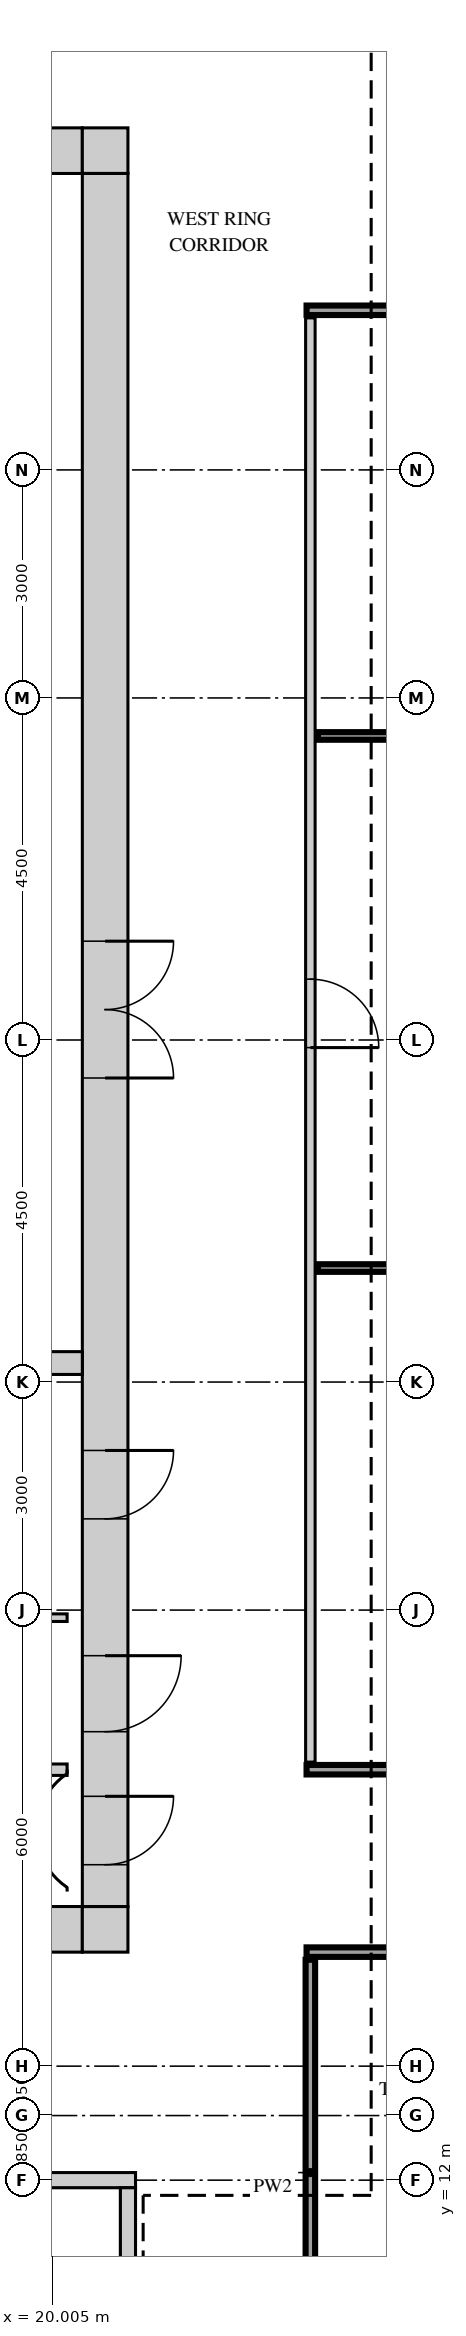
"""IFC4 building model, lengths in metres.
Left out: names, types, materials, properties, quantities, classifications, styles, units other than length and angle.
Written with IfcOpenShell. Run it as: python <this file> out.ifc"""

import sys

from ifc_helpers import new_model, si_unit, direction, frame, frame_2d, origin, place, context, subcontext, project, spatial, rectangle, extrude, source, transform, mapped, element, fill, save


model = new_model("IFC4")
c1 = context("Model", 3, precision=1e-05, world=origin(), true_north=direction((0.0, 1.0)))
c2 = subcontext(c1, "Body", "Model", "MODEL_VIEW")
j1 = project(units=[si_unit("LENGTHUNIT", "METRE"), si_unit("PLANEANGLEUNIT", "RADIAN")], contexts=[c1])
p1 = place(None, origin())
s1 = spatial("IfcSite", under=j1, at=p1, CompositionType="ELEMENT")
p2 = place(p1, origin())
s2 = spatial("IfcBuilding", under=s1, at=p2, CompositionType="ELEMENT")
p3 = place(p2, frame((0.0, 0.0, 290.2)))
s3 = spatial("IfcBuildingStorey", under=s2, at=p3, CompositionType="ELEMENT", Elevation=290.2)
m1 = source(origin(), c2, "Body", "SweptSolid", [
    extrude(rectangle(XDim=14.4, YDim=0.6, at=frame_2d((7.2, 0.0))), origin(), (0.0, 0.0, 1.0), 3.75),
])
p4 = place(p3, frame((6.0, 38.7, 0.0), z_axis=(0.0, 0.0, 1.0), x_axis=(1.0, 0.0, 0.0)))
e1 = element("IfcWall", 1, at=p4, inside=s3, PredefinedType="SHEAR", context=c2, shape_type="MappedRepresentation", body=[
    mapped(m1, transform((0.0, 0.0, 0.0))),
])
m2 = source(origin(), c2, "Body", "SweptSolid", [
    extrude(rectangle(XDim=0.9, YDim=2.1, at=frame_2d((0.45, 1.05))), frame((0.0, 0.31, 0.0), z_axis=(0.0, -1.0, 0.0), x_axis=(1.0, 0.0, 0.0)), (0.0, 0.0, 1.0), 0.62),
])
p5 = place(p4, frame((2.55, 0.0, 0.0)))
e2 = element("IfcOpeningElement", 2, at=p5, cuts=e1, PredefinedType="OPENING", context=c2, shape_type="MappedRepresentation", body=[
    mapped(m2, transform((0.0, 0.0, 0.0))),
])
p6 = place(p4, frame((7.0, 0.0, 0.0)))
e3 = element("IfcOpeningElement", 3, at=p6, cuts=e1, PredefinedType="OPENING", context=c2, shape_type="MappedRepresentation", body=[
    mapped(m2, transform((0.0, 0.0, 0.0))),
])
p7 = place(p4, frame((11.5, 0.0, 0.0)))
e4 = element("IfcOpeningElement", 4, at=p7, cuts=e1, PredefinedType="OPENING", context=c2, shape_type="MappedRepresentation", body=[
    mapped(m2, transform((0.0, 0.0, 0.0))),
])
m3 = source(origin(), c2, "Body", "SweptSolid", [
    extrude(rectangle(XDim=0.6, YDim=0.6, at=frame_2d((0.3, 0.0))), origin(), (0.0, 0.0, 1.0), 3.75),
])
p8 = place(p3, frame((20.4, 38.7, 0.0), z_axis=(0.0, 0.0, 1.0), x_axis=(1.0, 0.0, 0.0)))
e5 = element("IfcWall", 5, at=p8, inside=s3, PredefinedType="SHEAR", context=c2, shape_type="MappedRepresentation", body=[
    mapped(m3, transform((0.0, 0.0, 0.0))),
])
p9 = place(p3, frame((6.0, 15.3, 0.0), z_axis=(0.0, 0.0, 1.0), x_axis=(1.0, 0.0, 0.0)))
e6 = element("IfcWall", 6, at=p9, inside=s3, PredefinedType="SHEAR", context=c2, shape_type="MappedRepresentation", body=[
    mapped(m1, transform((0.0, 0.0, 0.0))),
])
m4 = source(origin(), c2, "Body", "SweptSolid", [
    extrude(rectangle(XDim=1.2, YDim=2.1, at=frame_2d((0.6, 1.05))), frame((0.0, 0.31, 0.0), z_axis=(0.0, -1.0, 0.0), x_axis=(1.0, 0.0, 0.0)), (0.0, 0.0, 1.0), 0.62),
])
p10 = place(p9, frame((6.2, 0.0, 0.0)))
e7 = element("IfcOpeningElement", 7, at=p10, cuts=e6, PredefinedType="OPENING", context=c2, shape_type="MappedRepresentation", body=[
    mapped(m4, transform((0.0, 0.0, 0.0))),
])
p11 = place(p9, frame((2.85, 0.0, 0.0)))
e8 = element("IfcOpeningElement", 8, at=p11, cuts=e6, PredefinedType="OPENING", context=c2, shape_type="MappedRepresentation", body=[
    mapped(m4, transform((0.0, 0.0, 0.0))),
])
m5 = source(origin(), c2, "Body", "SweptSolid", [
    extrude(rectangle(XDim=1.0, YDim=2.1, at=frame_2d((0.5, 1.05))), frame((0.0, 0.31, 0.0), z_axis=(0.0, -1.0, 0.0), x_axis=(1.0, 0.0, 0.0)), (0.0, 0.0, 1.0), 0.62),
])
p12 = place(p9, frame((8.7, 0.0, 0.0)))
e9 = element("IfcOpeningElement", 9, at=p12, cuts=e6, PredefinedType="OPENING", context=c2, shape_type="MappedRepresentation", body=[
    mapped(m5, transform((0.0, 0.0, 0.0))),
])
p13 = place(p3, frame((20.4, 15.3, 0.0), z_axis=(0.0, 0.0, 1.0), x_axis=(1.0, 0.0, 0.0)))
e10 = element("IfcWall", 10, at=p13, inside=s3, PredefinedType="SHEAR", context=c2, shape_type="MappedRepresentation", body=[
    mapped(m3, transform((0.0, 0.0, 0.0))),
])
m6 = source(origin(), c2, "Body", "SweptSolid", [
    extrude(rectangle(XDim=22.8, YDim=0.6, at=frame_2d((11.4, 0.0))), origin(), (0.0, 0.0, 1.0), 3.75),
])
p14 = place(p3, frame((20.7, 15.6, 0.0), z_axis=(0.0, 0.0, 1.0), x_axis=(0.0, 1.0, 0.0)))
e11 = element("IfcWall", 11, at=p14, inside=s3, PredefinedType="SHEAR", context=c2, shape_type="MappedRepresentation", body=[
    mapped(m6, transform((0.0, 0.0, 0.0))),
])
m7 = source(origin(), c2, "Body", "SweptSolid", [
    extrude(rectangle(XDim=1.8, YDim=2.1, at=frame_2d((0.9, 1.05))), frame((0.0, 0.31, 0.0), z_axis=(0.0, -1.0, 0.0), x_axis=(1.0, 0.0, 0.0)), (0.0, 0.0, 1.0), 0.62),
])
p15 = place(p14, frame((10.9, 0.0, 0.0)))
e12 = element("IfcOpeningElement", 12, at=p15, cuts=e11, PredefinedType="OPENING", context=c2, shape_type="MappedRepresentation", body=[
    mapped(m7, transform((0.0, 0.0, 0.0))),
])
p16 = place(p14, frame((0.55, 0.0, 0.0)))
e13 = element("IfcOpeningElement", 13, at=p16, cuts=e11, PredefinedType="OPENING", context=c2, shape_type="MappedRepresentation", body=[
    mapped(m2, transform((0.0, 0.0, 0.0))),
])
p17 = place(p14, frame((2.3, 0.0, 0.0)))
e14 = element("IfcOpeningElement", 14, at=p17, cuts=e11, PredefinedType="OPENING", context=c2, shape_type="MappedRepresentation", body=[
    mapped(m5, transform((0.0, 0.0, 0.0))),
])
p18 = place(p14, frame((5.1, 0.0, 0.0)))
e15 = element("IfcOpeningElement", 15, at=p18, cuts=e11, PredefinedType="OPENING", context=c2, shape_type="MappedRepresentation", body=[
    mapped(m2, transform((0.0, 0.0, 0.0))),
])
m8 = source(origin(), c2, "Body", "SweptSolid", [
    extrude(rectangle(XDim=7.2, YDim=0.2, at=frame_2d((3.6, 0.0))), origin(), (0.0, 0.0, 1.0), 3.75),
])
p19 = place(p3, frame((13.9, 12.0, 0.0), z_axis=(0.0, 0.0, 1.0), x_axis=(1.0, 0.0, 0.0)))
e16 = element("IfcWall", 16, at=p19, inside=s3, PredefinedType="SHEAR", context=c2, shape_type="MappedRepresentation", body=[
    mapped(m8, transform((0.0, 0.0, 0.0))),
])
m9 = source(origin(), c2, "Body", "SweptSolid", [
    extrude(rectangle(XDim=3.35, YDim=0.2, at=frame_2d((1.675, 0.0))), origin(), (0.0, 0.0, 1.0), 3.75),
])
p20 = place(p3, frame((21.0, 8.55, 0.0), z_axis=(0.0, 0.0, 1.0), x_axis=(0.0, 1.0, 0.0)))
e17 = element("IfcWall", 17, at=p20, inside=s3, PredefinedType="SHEAR", context=c2, shape_type="MappedRepresentation", body=[
    mapped(m9, transform((0.0, 0.0, 0.0))),
])
m10 = source(origin(), c2, "Body", "SweptSolid", [
    extrude(rectangle(XDim=13.2, YDim=0.3, at=frame_2d((6.6, 0.0))), origin(), (0.0, 0.0, 1.0), 3.75),
])
p21 = place(p3, frame((7.2, 22.75, 0.0), z_axis=(0.0, 0.0, 1.0), x_axis=(1.0, 0.0, 0.0)))
e18 = element("IfcWall", 18, at=p21, inside=s3, PredefinedType="STANDARD", context=c2, shape_type="MappedRepresentation", body=[
    mapped(m10, transform((0.0, 0.0, 0.0))),
])
m11 = source(origin(), c2, "Body", "SweptSolid", [
    extrude(rectangle(XDim=8.75, YDim=0.125, at=frame_2d((4.375, 0.0))), origin(), (0.0, 0.0, 1.0), 3.8),
])
p22 = place(p3, frame((23.4, 6.15, 0.0), z_axis=(0.0, 0.0, 1.0), x_axis=(0.0, 1.0, 0.0)))
e19 = element("IfcWall", 19, at=p22, inside=s3, PredefinedType="PARTITIONING", context=c2, shape_type="MappedRepresentation", body=[
    mapped(m11, transform((0.0, 0.0, 0.0))),
])
m12 = source(origin(), c2, "Body", "SweptSolid", [
    extrude(rectangle(XDim=0.9, YDim=2.1, at=frame_2d((0.45, 1.05))), frame((0.0, 0.073, 0.0), z_axis=(0.0, -1.0, 0.0), x_axis=(1.0, 0.0, 0.0)), (0.0, 0.0, 1.0), 0.145),
])
p23 = place(p22, frame((2.25, 0.0, 0.0)))
e20 = element("IfcOpeningElement", 20, at=p23, cuts=e19, PredefinedType="OPENING", context=c2, shape_type="MappedRepresentation", body=[
    mapped(m12, transform((0.0, 0.0, 0.0))),
])
m13 = source(origin(), c2, "Body", "SweptSolid", [
    extrude(rectangle(XDim=19.1, YDim=0.125, at=frame_2d((9.55, 0.0))), origin(), (0.0, 0.0, 1.0), 3.8),
])
p24 = place(p3, frame((23.35, 15.0, 0.0), z_axis=(0.0, 0.0, 1.0), x_axis=(1.0, 0.0, 0.0)))
e21 = element("IfcWall", 21, at=p24, inside=s3, PredefinedType="PARTITIONING", context=c2, shape_type="MappedRepresentation", body=[
    mapped(m13, transform((0.0, 0.0, 0.0))),
])
p25 = place(p24, frame((7.1, 0.0, 0.0)))
e22 = element("IfcOpeningElement", 22, at=p25, cuts=e21, PredefinedType="OPENING", context=c2, shape_type="MappedRepresentation", body=[
    mapped(m12, transform((0.0, 0.0, 0.0))),
])
p26 = place(p24, frame((13.3, 0.0, 0.0)))
e23 = element("IfcOpeningElement", 23, at=p26, cuts=e21, PredefinedType="OPENING", context=c2, shape_type="MappedRepresentation", body=[
    mapped(m12, transform((0.0, 0.0, 0.0))),
])
m14 = source(origin(), c2, "Body", "SweptSolid", [
    extrude(rectangle(XDim=4.0, YDim=0.15, at=frame_2d((2.0, 0.0))), origin(), (0.0, 0.0, 1.0), 3.8),
])
p27 = place(p3, frame((16.2, 17.4, 0.0), z_axis=(0.0, 0.0, 1.0), x_axis=(1.0, 0.0, 0.0)))
e24 = element("IfcWall", 24, at=p27, inside=s3, PredefinedType="PARTITIONING", context=c2, shape_type="MappedRepresentation", body=[
    mapped(m14, transform((0.0, 0.0, 0.0))),
])
m15 = source(origin(), c2, "Body", "SweptSolid", [
    extrude(rectangle(XDim=16.7, YDim=0.125, at=frame_2d((8.35, 0.0))), origin(), (0.0, 0.0, 1.0), 3.8),
])
p28 = place(p3, frame((23.35, 17.4, 0.0), z_axis=(0.0, 0.0, 1.0), x_axis=(1.0, 0.0, 0.0)))
e25 = element("IfcWall", 25, at=p28, inside=s3, PredefinedType="PARTITIONING", context=c2, shape_type="MappedRepresentation", body=[
    mapped(m15, transform((0.0, 0.0, 0.0))),
])
p29 = place(p28, frame((8.05, 0.0, 0.0)))
e26 = element("IfcOpeningElement", 26, at=p29, cuts=e25, PredefinedType="OPENING", context=c2, shape_type="MappedRepresentation", body=[
    mapped(m12, transform((0.0, 0.0, 0.0))),
])
m16 = source(origin(), c2, "Body", "SweptSolid", [
    extrude(rectangle(XDim=19.0, YDim=0.125, at=frame_2d((9.5, 0.0))), origin(), (0.0, 0.0, 1.0), 3.8),
])
p30 = place(p3, frame((23.4, 17.5, 0.0), z_axis=(0.0, 0.0, 1.0), x_axis=(0.0, 1.0, 0.0)))
e27 = element("IfcWall", 27, at=p30, inside=s3, PredefinedType="PARTITIONING", context=c2, shape_type="MappedRepresentation", body=[
    mapped(m16, transform((0.0, 0.0, 0.0))),
])
p31 = place(p30, frame((9.4, 0.0, 0.0)))
e28 = element("IfcOpeningElement", 28, at=p31, cuts=e27, PredefinedType="OPENING", context=c2, shape_type="MappedRepresentation", body=[
    mapped(m12, transform((0.0, 0.0, 0.0))),
])
m17 = source(origin(), c2, "Body", "SweptSolid", [
    extrude(rectangle(XDim=4.1, YDim=0.1, at=frame_2d((2.05, 0.0))), origin(), (0.0, 0.0, 1.0), 3.8),
])
p32 = place(p3, frame((16.1, 19.4, 0.0), z_axis=(0.0, 0.0, 1.0), x_axis=(1.0, 0.0, 0.0)))
e29 = element("IfcWall", 29, at=p32, inside=s3, PredefinedType="PARTITIONING", context=c2, shape_type="MappedRepresentation", body=[
    mapped(m17, transform((0.0, 0.0, 0.0))),
])
m18 = source(origin(), c2, "Body", "SweptSolid", [
    extrude(rectangle(XDim=16.4, YDim=0.1, at=frame_2d((8.2, 0.0))), origin(), (0.0, 0.0, 1.0), 3.8),
])
for number, where, z_axis, x_axis in (
    (30, (23.5, 24.0, 0.0), (0.0, 0.0, 1.0), (1.0, 0.0, 0.0)),
    (31, (23.5, 31.0, 0.0), (0.0, 0.0, 1.0), (1.0, 0.0, 0.0)),
):
    element("IfcWall", number, at=place(p3, frame(where, z_axis=z_axis, x_axis=x_axis)), inside=s3, PredefinedType="PARTITIONING", context=c2, shape_type="MappedRepresentation", body=[
        mapped(m18, transform((0.0, 0.0, 0.0))),
    ])
p33 = place(p3, frame((23.35, 36.6, 0.0), z_axis=(0.0, 0.0, 1.0), x_axis=(1.0, 0.0, 0.0)))
e32 = element("IfcWall", 32, at=p33, inside=s3, PredefinedType="PARTITIONING", context=c2, shape_type="MappedRepresentation", body=[
    mapped(m15, transform((0.0, 0.0, 0.0))),
])
p34 = place(p33, frame((8.05, 0.0, 0.0)))
e33 = element("IfcOpeningElement", 33, at=p34, cuts=e32, PredefinedType="OPENING", context=c2, shape_type="MappedRepresentation", body=[
    mapped(m12, transform((0.0, 0.0, 0.0))),
])
m19 = source(origin(), c2, "Body", "SweptSolid", [
    extrude(rectangle(XDim=1.8, YDim=2.1, at=frame_2d((0.9, 1.05))), frame((0.0, 0.25, 0.0), z_axis=(0.0, -1.0, 0.0), x_axis=(1.0, 0.0, 0.0)), (0.0, 0.0, 1.0), 0.5),
])
p35 = place(p15, origin())
e34 = element("IfcDoor", 34, at=p35, inside=s3, OperationType="DOUBLE_DOOR_SINGLE_SWING", PredefinedType="DOOR", context=c2, shape_type="MappedRepresentation", body=[
    mapped(m19, transform((0.0, 0.0, 0.0))),
])
fill(e12, e34)
m20 = source(origin(), c2, "Body", "SweptSolid", [
    extrude(rectangle(XDim=0.9, YDim=2.1, at=frame_2d((0.45, 1.05))), frame((0.0, 0.25, 0.0), z_axis=(0.0, -1.0, 0.0), x_axis=(1.0, 0.0, 0.0)), (0.0, 0.0, 1.0), 0.5),
])
p36 = place(p16, origin())
e35 = element("IfcDoor", 35, at=p36, inside=s3, OperationType="SINGLE_SWING_RIGHT", PredefinedType="DOOR", context=c2, shape_type="MappedRepresentation", body=[
    mapped(m20, transform((0.0, 0.0, 0.0))),
])
fill(e13, e35)
m21 = source(origin(), c2, "Body", "SweptSolid", [
    extrude(rectangle(XDim=1.0, YDim=2.1, at=frame_2d((0.5, 1.05))), frame((0.0, 0.25, 0.0), z_axis=(0.0, -1.0, 0.0), x_axis=(1.0, 0.0, 0.0)), (0.0, 0.0, 1.0), 0.5),
])
p37 = place(p17, origin())
e36 = element("IfcDoor", 36, at=p37, inside=s3, OperationType="SINGLE_SWING_RIGHT", PredefinedType="DOOR", context=c2, shape_type="MappedRepresentation", body=[
    mapped(m21, transform((0.0, 0.0, 0.0))),
])
fill(e14, e36)
p38 = place(p18, origin())
e37 = element("IfcDoor", 37, at=p38, inside=s3, OperationType="SINGLE_SWING_RIGHT", PredefinedType="DOOR", context=c2, shape_type="MappedRepresentation", body=[
    mapped(m20, transform((0.0, 0.0, 0.0))),
])
fill(e15, e37)
m22 = source(origin(), c2, "Body", "SweptSolid", [
    extrude(rectangle(XDim=0.9, YDim=2.1, at=frame_2d((0.45, 1.05))), frame((0.0, 0.025, 0.0), z_axis=(0.0, -1.0, 0.0), x_axis=(1.0, 0.0, 0.0)), (0.0, 0.0, 1.0), 0.05),
])
p39 = place(p31, origin())
e38 = element("IfcDoor", 38, at=p39, inside=s3, OperationType="SINGLE_SWING_LEFT", PredefinedType="DOOR", context=c2, shape_type="MappedRepresentation", body=[
    mapped(m22, transform((0.0, 0.0, 0.0))),
])
fill(e28, e38)
save(model, sys.argv[1])
